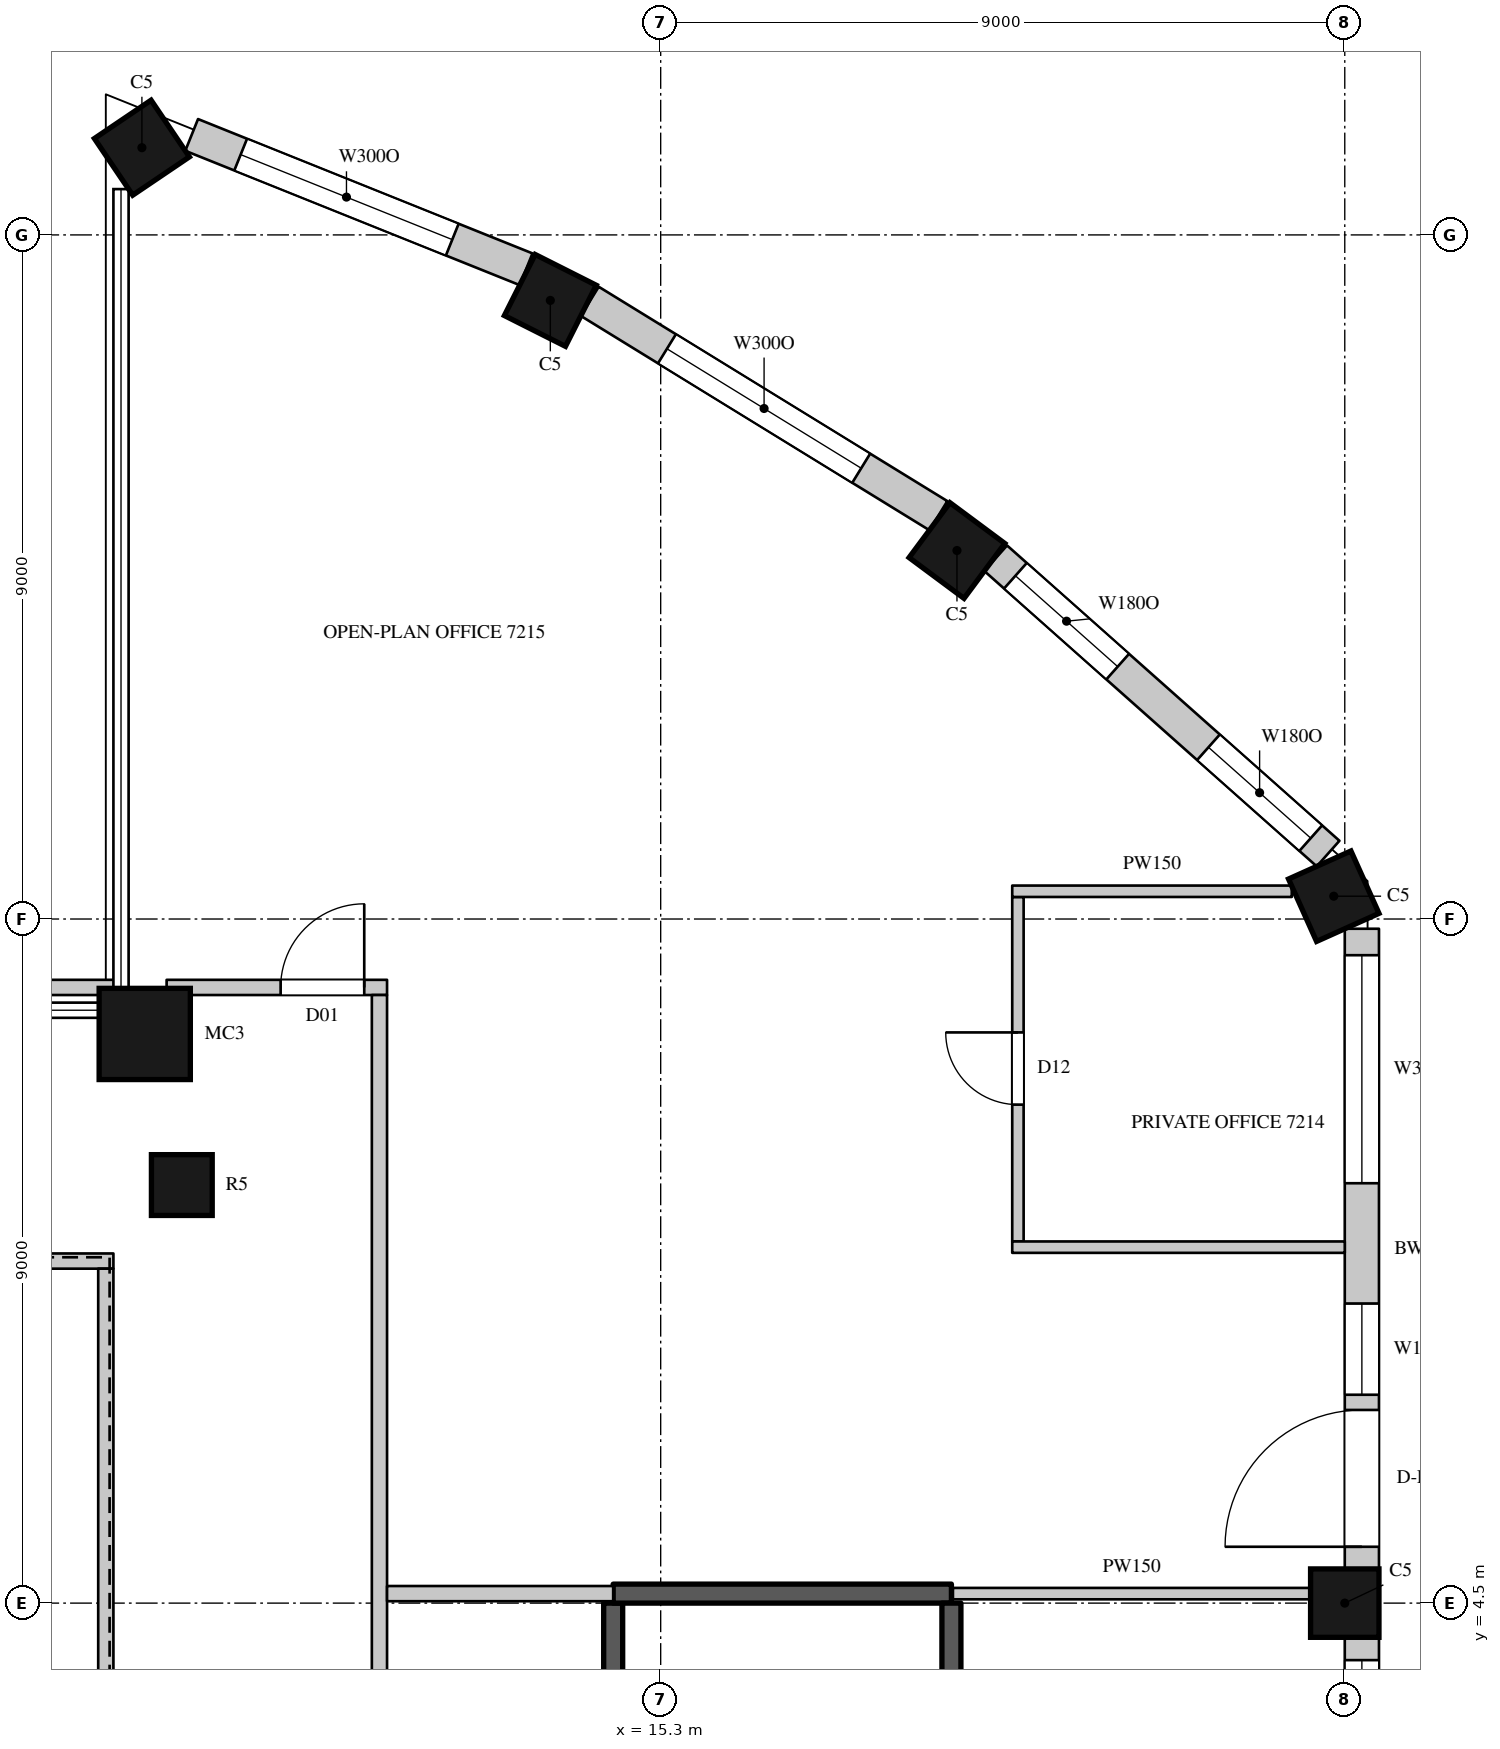
"""IFC4 building model, lengths in metres.
Left out: names, types, materials, properties, quantities, classifications, styles, units other than length and angle.
Written with IfcOpenShell. Run it as: python <this file> out.ifc"""

import sys

from ifc_helpers import new_model, si_unit, direction, frame, frame_2d, origin, origin_2d, place, context, subcontext, project, spatial, rectangle, circle, extrude, element, fill, save


model = new_model("IFC4")
c1 = context("Model", 3, precision=1e-05, world=origin(), true_north=direction((0.0, 1.0)))
c2 = subcontext(c1, "Body", "Model", "MODEL_VIEW")
j1 = project(units=[si_unit("LENGTHUNIT", "METRE"), si_unit("PLANEANGLEUNIT", "RADIAN")], contexts=[c1])
p1 = place(None, origin())
s1 = spatial("IfcSite", under=j1, at=p1, CompositionType="ELEMENT")
p2 = place(p1, origin())
s2 = spatial("IfcBuilding", under=s1, at=p2, CompositionType="ELEMENT")
p3 = place(p2, frame((0.0, 0.0, 317.2)))
s3 = spatial("IfcBuildingStorey", under=s2, at=p3, CompositionType="ELEMENT", Elevation=317.2)
p4 = place(p3, frame((8.475, 23.647, 0.0), z_axis=(0.0, 0.0, 1.0), x_axis=(-0.828469606019, -0.560034027451, 0.0)))
e1 = element("IfcColumn", 1, at=p4, inside=s3, PredefinedType="COLUMN", context=c2, shape_type="SweptSolid", body=[
    extrude(rectangle(XDim=0.9, YDim=0.9, at=origin_2d()), origin(), (0.0, 0.0, 1.0), 4.1),
])
p5 = place(p3, frame((8.512, 11.988, 0.0), z_axis=(0.0, 0.0, 1.0), x_axis=(1.0, 0.0, 0.0)))
e2 = element("IfcColumn", 2, at=p5, inside=s3, PredefinedType="COLUMN", context=c2, shape_type="SweptSolid", body=[
    extrude(circle(Radius=0.6, at=origin_2d()), origin(), (0.0, 0.0, 1.0), 4.1),
])
for number, where, z_axis, x_axis in (
    (3, (24.3, 4.5, 0.0), (0.0, 0.0, 1.0), (0.0, 1.0, 0.0)),
    (4, (24.155, 13.8, 0.0), (0.0, 0.0, 1.0), (-0.41, 0.912, 0.0)),
    (5, (19.198, 18.348, 0.0), (0.0, 0.0, 1.0), (-0.803, 0.596, 0.0)),
    (6, (13.848, 21.638, 0.0), (0.0, 0.0, 1.0), (-0.893, 0.45, 0.0)),
):
    element("IfcColumn", number, at=place(p3, frame(where, z_axis=z_axis, x_axis=x_axis)), inside=s3, PredefinedType="COLUMN", context=c2, shape_type="SweptSolid", body=[
        extrude(rectangle(XDim=0.9, YDim=0.9, at=origin_2d()), origin(), (0.0, 0.0, 1.0), 4.1),
    ])
p6 = place(p3, frame((9.0, 10.0, 0.0), z_axis=(0.0, 0.0, 1.0), x_axis=(1.0, 0.0, 0.0)))
e7 = element("IfcColumn", 7, at=p6, inside=s3, PredefinedType="COLUMN", context=c2, shape_type="SweptSolid", body=[
    extrude(circle(Radius=0.4, at=origin_2d()), origin(), (0.0, 0.0, 1.0), 4.1),
])
p7 = place(p3, frame((24.525, -4.05, 0.0), z_axis=(0.0, 0.0, 1.0), x_axis=(0.0, 1.0, 0.0)))
e8 = element("IfcWall", 8, at=p7, inside=s3, PredefinedType="SOLIDWALL", context=c2, shape_type="SweptSolid", body=[
    extrude(rectangle(XDim=8.1, YDim=0.45, at=frame_2d((4.05, 0.0))), origin(), (0.0, 0.0, 1.0), 3.8),
])
p8 = place(p7, frame((0.3, 0.0, 1.05)))
e9 = element("IfcOpeningElement", 9, at=p8, cuts=e8, PredefinedType="OPENING", context=c2, shape_type="SweptSolid", body=[
    extrude(rectangle(XDim=3.0, YDim=2.4, at=frame_2d((1.5, 1.2))), frame((0.0, 0.235, 0.0), z_axis=(0.0, -1.0, 0.0), x_axis=(1.0, 0.0, 0.0)), (0.0, 0.0, 1.0), 0.47),
])
p9 = place(p7, frame((4.8, 0.0, 1.05)))
e10 = element("IfcOpeningElement", 10, at=p9, cuts=e8, PredefinedType="OPENING", context=c2, shape_type="SweptSolid", body=[
    extrude(rectangle(XDim=3.0, YDim=2.4, at=frame_2d((1.5, 1.2))), frame((0.0, 0.235, 0.0), z_axis=(0.0, -1.0, 0.0), x_axis=(1.0, 0.0, 0.0)), (0.0, 0.0, 1.0), 0.47),
])
p10 = place(p3, frame((24.525, 4.95, 0.0), z_axis=(0.0, 0.0, 1.0), x_axis=(0.0, 1.0, 0.0)))
e11 = element("IfcWall", 11, at=p10, inside=s3, PredefinedType="SOLIDWALL", context=c2, shape_type="SweptSolid", body=[
    extrude(rectangle(XDim=8.422, YDim=0.45, at=frame_2d((4.211, 0.0))), origin(), (0.0, 0.0, 1.0), 3.8),
])
p11 = place(p10, frame((0.291, 0.0, 0.0)))
e12 = element("IfcOpeningElement", 12, at=p11, cuts=e11, PredefinedType="OPENING", context=c2, shape_type="SweptSolid", body=[
    extrude(rectangle(XDim=1.8, YDim=2.4, at=frame_2d((0.9, 1.2))), frame((0.0, 0.235, 0.0), z_axis=(0.0, -1.0, 0.0), x_axis=(1.0, 0.0, 0.0)), (0.0, 0.0, 1.0), 0.47),
])
p12 = place(p10, frame((2.291, 0.0, 1.05)))
e13 = element("IfcOpeningElement", 13, at=p12, cuts=e11, PredefinedType="OPENING", context=c2, shape_type="SweptSolid", body=[
    extrude(rectangle(XDim=1.2, YDim=2.4, at=frame_2d((0.6, 1.2))), frame((0.0, 0.235, 0.0), z_axis=(0.0, -1.0, 0.0), x_axis=(1.0, 0.0, 0.0)), (0.0, 0.0, 1.0), 0.47),
])
p13 = place(p10, frame((5.074, 0.0, 1.05)))
e14 = element("IfcOpeningElement", 14, at=p13, cuts=e11, PredefinedType="OPENING", context=c2, shape_type="SweptSolid", body=[
    extrude(rectangle(XDim=3.0, YDim=2.4, at=frame_2d((1.5, 1.2))), frame((0.0, 0.235, 0.0), z_axis=(0.0, -1.0, 0.0), x_axis=(1.0, 0.0, 0.0)), (0.0, 0.0, 1.0), 0.47),
])
p14 = place(p3, frame((24.081, 14.361, 0.0), z_axis=(0.0, 0.0, 1.0), x_axis=(-0.747570482973, 0.664182484704, 0.0)))
e15 = element("IfcWall", 15, at=p14, inside=s3, PredefinedType="SOLIDWALL", context=c2, shape_type="SweptSolid", body=[
    extrude(rectangle(XDim=5.85, YDim=0.45, at=frame_2d((2.925, 0.0))), origin(), (0.0, 0.0, 1.0), 3.8),
])
p15 = place(p14, frame((0.305, 0.0, 1.05)))
e16 = element("IfcOpeningElement", 16, at=p15, cuts=e15, PredefinedType="OPENING", context=c2, shape_type="SweptSolid", body=[
    extrude(rectangle(XDim=1.8, YDim=2.4, at=frame_2d((0.9, 1.2))), frame((0.0, 0.235, 0.0), z_axis=(0.0, -1.0, 0.0), x_axis=(1.0, 0.0, 0.0)), (0.0, 0.0, 1.0), 0.47),
])
p16 = place(p14, frame((3.703, 0.0, 1.05)))
e17 = element("IfcOpeningElement", 17, at=p16, cuts=e15, PredefinedType="OPENING", context=c2, shape_type="SweptSolid", body=[
    extrude(rectangle(XDim=1.8, YDim=2.4, at=frame_2d((0.9, 1.2))), frame((0.0, 0.235, 0.0), z_axis=(0.0, -1.0, 0.0), x_axis=(1.0, 0.0, 0.0)), (0.0, 0.0, 1.0), 0.47),
])
p17 = place(p3, frame((18.953, 18.806, 0.0), z_axis=(0.0, 0.0, 1.0), x_axis=(-0.851860664503, 0.523768468193, 0.0)))
e18 = element("IfcWall", 18, at=p17, inside=s3, PredefinedType="SOLIDWALL", context=c2, shape_type="SweptSolid", body=[
    extrude(rectangle(XDim=5.384, YDim=0.45, at=frame_2d((2.692, 0.0))), origin(), (0.0, 0.0, 1.0), 3.8),
])
p18 = place(p17, frame((1.192, 0.0, 1.05)))
e19 = element("IfcOpeningElement", 19, at=p18, cuts=e18, PredefinedType="OPENING", context=c2, shape_type="SweptSolid", body=[
    extrude(rectangle(XDim=3.0, YDim=2.4, at=frame_2d((1.5, 1.2))), frame((0.0, 0.235, 0.0), z_axis=(0.0, -1.0, 0.0), x_axis=(1.0, 0.0, 0.0)), (0.0, 0.0, 1.0), 0.47),
])
p19 = place(p3, frame((13.529, 22.048, 0.0), z_axis=(0.0, 0.0, 1.0), x_axis=(-0.927957332619, 0.372686448424, 0.0)))
e20 = element("IfcWall", 20, at=p19, inside=s3, PredefinedType="SOLIDWALL", context=c2, shape_type="SweptSolid", body=[
    extrude(rectangle(XDim=4.741, YDim=0.45, at=frame_2d((2.371, 0.0))), origin(), (0.0, 0.0, 1.0), 3.8),
])
p20 = place(p19, frame((1.047, 0.0, 1.05)))
e21 = element("IfcOpeningElement", 21, at=p20, cuts=e20, PredefinedType="OPENING", context=c2, shape_type="SweptSolid", body=[
    extrude(rectangle(XDim=3.0, YDim=2.4, at=frame_2d((1.5, 1.2))), frame((0.0, 0.235, 0.0), z_axis=(0.0, -1.0, 0.0), x_axis=(1.0, 0.0, 0.0)), (0.0, 0.0, 1.0), 0.47),
])
p21 = place(p3, frame((6.75, 12.6, 0.0), z_axis=(0.0, 0.0, 1.0), x_axis=(1.0, 0.0, 0.0)))
e22 = element("IfcWall", 22, at=p21, inside=s3, PredefinedType="PARTITIONING", context=c2, shape_type="SweptSolid", body=[
    extrude(rectangle(XDim=1.48, YDim=0.2, at=frame_2d((0.74, 0.0))), origin(), (0.0, 0.0, 1.0), 3.8),
])
p22 = place(p3, frame((-6.1, 9.0, 0.0), z_axis=(0.0, 0.0, 1.0), x_axis=(1.0, 0.0, 0.0)))
e23 = element("IfcWall", 23, at=p22, inside=s3, PredefinedType="PARTITIONING", context=c2, shape_type="SweptSolid", body=[
    extrude(rectangle(XDim=14.2, YDim=0.2, at=frame_2d((7.1, 0.0))), origin(), (0.0, 0.0, 1.0), 3.8),
])
p23 = place(p3, frame((8.0, 0.02, 0.0), z_axis=(0.0, 0.0, 1.0), x_axis=(0.0, 1.0, 0.0)))
e24 = element("IfcWall", 24, at=p23, inside=s3, PredefinedType="PARTITIONING", context=c2, shape_type="SweptSolid", body=[
    extrude(rectangle(XDim=8.88, YDim=0.2, at=frame_2d((4.44, 0.0))), origin(), (0.0, 0.0, 1.0), 3.8),
])
p24 = place(p3, frame((8.8, 12.6, 0.0), z_axis=(0.0, 0.0, 1.0), x_axis=(1.0, 0.0, 0.0)))
e25 = element("IfcWall", 25, at=p24, inside=s3, PredefinedType="PARTITIONING", context=c2, shape_type="SweptSolid", body=[
    extrude(rectangle(XDim=2.9, YDim=0.2, at=frame_2d((1.45, 0.0))), origin(), (0.0, 0.0, 1.0), 3.8),
])
p25 = place(p24, frame((1.5, 0.0, 0.0)))
e26 = element("IfcOpeningElement", 26, at=p25, cuts=e25, PredefinedType="OPENING", context=c2, shape_type="SweptSolid", body=[
    extrude(rectangle(XDim=1.1, YDim=2.4, at=frame_2d((0.55, 1.2))), frame((0.0, 0.11, 0.0), z_axis=(0.0, -1.0, 0.0), x_axis=(1.0, 0.0, 0.0)), (0.0, 0.0, 1.0), 0.22),
])
p26 = place(p3, frame((11.6, -12.5, 0.0), z_axis=(0.0, 0.0, 1.0), x_axis=(0.0, 1.0, 0.0)))
e27 = element("IfcWall", 27, at=p26, inside=s3, PredefinedType="PARTITIONING", context=c2, shape_type="SweptSolid", body=[
    extrude(rectangle(XDim=25.0, YDim=0.2, at=frame_2d((12.5, 0.0))), origin(), (0.0, 0.0, 1.0), 3.8),
])
p27 = place(p26, frame((9.4, 0.0, 0.0)))
e28 = element("IfcOpeningElement", 28, at=p27, cuts=e27, PredefinedType="OPENING", context=c2, shape_type="SweptSolid", body=[
    extrude(rectangle(XDim=1.5, YDim=2.4, at=frame_2d((0.75, 1.2))), frame((0.0, 0.11, 0.0), z_axis=(0.0, -1.0, 0.0), x_axis=(1.0, 0.0, 0.0)), (0.0, 0.0, 1.0), 0.22),
])
p28 = place(p26, frame((5.5, 0.0, 0.0)))
e29 = element("IfcOpeningElement", 29, at=p28, cuts=e27, PredefinedType="OPENING", context=c2, shape_type="SweptSolid", body=[
    extrude(rectangle(XDim=1.1, YDim=2.4, at=frame_2d((0.55, 1.2))), frame((0.0, 0.11, 0.0), z_axis=(0.0, -1.0, 0.0), x_axis=(1.0, 0.0, 0.0)), (0.0, 0.0, 1.0), 0.22),
])
p29 = place(p3, frame((11.7, 4.625, 0.0), z_axis=(0.0, 0.0, 1.0), x_axis=(1.0, 0.0, 0.0)))
e30 = element("IfcWall", 30, at=p29, inside=s3, PredefinedType="PARTITIONING", context=c2, shape_type="SweptSolid", body=[
    extrude(rectangle(XDim=2.975, YDim=0.2, at=frame_2d((1.488, 0.0))), origin(), (0.0, 0.0, 1.0), 3.8),
])
p30 = place(p3, frame((19.145, 4.625, 0.0), z_axis=(0.0, 0.0, 1.0), x_axis=(1.0, 0.0, 0.0)))
e31 = element("IfcWall", 31, at=p30, inside=s3, PredefinedType="PARTITIONING", context=c2, shape_type="SweptSolid", body=[
    extrude(rectangle(XDim=4.705, YDim=0.15, at=frame_2d((2.353, 0.0))), origin(), (0.0, 0.0, 1.0), 3.8),
])
p31 = place(p3, frame((20.0, 9.258, 0.0), z_axis=(0.0, 0.0, 1.0), x_axis=(0.0, 1.0, 0.0)))
e32 = element("IfcWall", 32, at=p31, inside=s3, PredefinedType="PARTITIONING", context=c2, shape_type="SweptSolid", body=[
    extrude(rectangle(XDim=4.532, YDim=0.15, at=frame_2d((2.266, 0.0))), origin(), (0.0, 0.0, 1.0), 3.8),
])
p32 = place(p31, frame((1.8, 0.0, 0.0)))
e33 = element("IfcOpeningElement", 33, at=p32, cuts=e32, PredefinedType="OPENING", context=c2, shape_type="SweptSolid", body=[
    extrude(rectangle(XDim=0.95, YDim=2.2, at=frame_2d((0.475, 1.1))), frame((0.0, 0.085, 0.0), z_axis=(0.0, -1.0, 0.0), x_axis=(1.0, 0.0, 0.0)), (0.0, 0.0, 1.0), 0.17),
])
p33 = place(p3, frame((19.925, 9.183, 0.0), z_axis=(0.0, 0.0, 1.0), x_axis=(1.0, 0.0, 0.0)))
e34 = element("IfcWall", 34, at=p33, inside=s3, PredefinedType="PARTITIONING", context=c2, shape_type="SweptSolid", body=[
    extrude(rectangle(XDim=4.375, YDim=0.15, at=frame_2d((2.188, 0.0))), origin(), (0.0, 0.0, 1.0), 3.15),
])
p34 = place(p3, frame((19.925, 13.865, 0.0), z_axis=(0.0, 0.0, 1.0), x_axis=(1.0, 0.0, 0.0)))
e35 = element("IfcWall", 35, at=p34, inside=s3, PredefinedType="PARTITIONING", context=c2, shape_type="SweptSolid", body=[
    extrude(rectangle(XDim=3.678, YDim=0.15, at=frame_2d((1.839, 0.0))), origin(), (0.0, 0.0, 1.0), 3.8),
])
p35 = place(p3, frame((14.675, -4.5, 0.0), z_axis=(0.0, 0.0, 1.0), x_axis=(0.0, 1.0, 0.0)))
e36 = element("IfcWall", 36, at=p35, inside=s3, PredefinedType="SHEAR", context=c2, shape_type="SweptSolid", body=[
    extrude(rectangle(XDim=9.0, YDim=0.25, at=frame_2d((4.5, 0.0))), origin(), (0.0, 0.0, 1.0), 3.8),
])
p36 = place(p35, frame((0.45, 0.0, 0.0)))
e37 = element("IfcOpeningElement", 37, at=p36, cuts=e36, PredefinedType="OPENING", context=c2, shape_type="SweptSolid", body=[
    extrude(rectangle(XDim=1.1, YDim=2.2, at=frame_2d((0.55, 1.1))), frame((0.0, 0.135, 0.0), z_axis=(0.0, -1.0, 0.0), x_axis=(1.0, 0.0, 0.0)), (0.0, 0.0, 1.0), 0.27),
])
p37 = place(p3, frame((14.675, 4.625, 0.0), z_axis=(0.0, 0.0, 1.0), x_axis=(1.0, 0.0, 0.0)))
e38 = element("IfcWall", 38, at=p37, inside=s3, PredefinedType="SHEAR", context=c2, shape_type="SweptSolid", body=[
    extrude(rectangle(XDim=4.45, YDim=0.25, at=frame_2d((2.225, 0.0))), origin(), (0.0, 0.0, 1.0), 3.8),
])
p38 = place(p3, frame((19.125, -4.5, 0.0), z_axis=(0.0, 0.0, 1.0), x_axis=(0.0, 1.0, 0.0)))
e39 = element("IfcWall", 39, at=p38, inside=s3, PredefinedType="SHEAR", context=c2, shape_type="SweptSolid", body=[
    extrude(rectangle(XDim=9.0, YDim=0.25, at=frame_2d((4.5, 0.0))), origin(), (0.0, 0.0, 1.0), 3.8),
])
p39 = place(p9, origin())
e40 = element("IfcWindow", 40, at=p39, inside=s3, PartitioningType="SINGLE_PANEL", PredefinedType="WINDOW", context=c2, shape_type="SweptSolid", body=[
    extrude(rectangle(XDim=3.0, YDim=2.4, at=frame_2d((1.5, 1.2))), frame((0.0, 0.135, 0.0), z_axis=(0.0, -1.0, 0.0), x_axis=(1.0, 0.0, 0.0)), (0.0, 0.0, 1.0), 0.06),
])
fill(e10, e40)
p40 = place(p11, origin())
e41 = element("IfcDoor", 41, at=p40, inside=s3, OperationType="SLIDING_TO_LEFT", PredefinedType="DOOR", context=c2, shape_type="SweptSolid", body=[
    extrude(rectangle(XDim=1.8, YDim=2.4, at=frame_2d((0.9, 1.2))), frame((0.0, 0.13, 0.0), z_axis=(0.0, -1.0, 0.0), x_axis=(1.0, 0.0, 0.0)), (0.0, 0.0, 1.0), 0.05),
])
fill(e12, e41)
p41 = place(p12, origin())
e42 = element("IfcWindow", 42, at=p41, inside=s3, PartitioningType="SINGLE_PANEL", PredefinedType="WINDOW", context=c2, shape_type="SweptSolid", body=[
    extrude(rectangle(XDim=1.2, YDim=2.4, at=frame_2d((0.6, 1.2))), frame((0.0, 0.135, 0.0), z_axis=(0.0, -1.0, 0.0), x_axis=(1.0, 0.0, 0.0)), (0.0, 0.0, 1.0), 0.06),
])
fill(e13, e42)
p42 = place(p13, origin())
e43 = element("IfcWindow", 43, at=p42, inside=s3, PartitioningType="SINGLE_PANEL", PredefinedType="WINDOW", context=c2, shape_type="SweptSolid", body=[
    extrude(rectangle(XDim=3.0, YDim=2.4, at=frame_2d((1.5, 1.2))), frame((0.0, 0.135, 0.0), z_axis=(0.0, -1.0, 0.0), x_axis=(1.0, 0.0, 0.0)), (0.0, 0.0, 1.0), 0.06),
])
fill(e14, e43)
p43 = place(p15, origin())
e44 = element("IfcWindow", 44, at=p43, inside=s3, PartitioningType="SINGLE_PANEL", PredefinedType="WINDOW", context=c2, shape_type="SweptSolid", body=[
    extrude(rectangle(XDim=1.8, YDim=2.4, at=frame_2d((0.9, 1.2))), frame((0.0, 0.135, 0.0), z_axis=(0.0, -1.0, 0.0), x_axis=(1.0, 0.0, 0.0)), (0.0, 0.0, 1.0), 0.06),
])
fill(e16, e44)
p44 = place(p16, origin())
e45 = element("IfcWindow", 45, at=p44, inside=s3, PartitioningType="SINGLE_PANEL", PredefinedType="WINDOW", context=c2, shape_type="SweptSolid", body=[
    extrude(rectangle(XDim=1.8, YDim=2.4, at=frame_2d((0.9, 1.2))), frame((0.0, 0.135, 0.0), z_axis=(0.0, -1.0, 0.0), x_axis=(1.0, 0.0, 0.0)), (0.0, 0.0, 1.0), 0.06),
])
fill(e17, e45)
p45 = place(p18, origin())
e46 = element("IfcWindow", 46, at=p45, inside=s3, PartitioningType="SINGLE_PANEL", PredefinedType="WINDOW", context=c2, shape_type="SweptSolid", body=[
    extrude(rectangle(XDim=3.0, YDim=2.4, at=frame_2d((1.5, 1.2))), frame((0.0, 0.135, 0.0), z_axis=(0.0, -1.0, 0.0), x_axis=(1.0, 0.0, 0.0)), (0.0, 0.0, 1.0), 0.06),
])
fill(e19, e46)
p46 = place(p20, origin())
e47 = element("IfcWindow", 47, at=p46, inside=s3, PartitioningType="SINGLE_PANEL", PredefinedType="WINDOW", context=c2, shape_type="SweptSolid", body=[
    extrude(rectangle(XDim=3.0, YDim=2.4, at=frame_2d((1.5, 1.2))), frame((0.0, 0.135, 0.0), z_axis=(0.0, -1.0, 0.0), x_axis=(1.0, 0.0, 0.0)), (0.0, 0.0, 1.0), 0.06),
])
fill(e21, e47)
p47 = place(p25, origin())
e48 = element("IfcDoor", 48, at=p47, inside=s3, OperationType="SINGLE_SWING_RIGHT", PredefinedType="DOOR", context=c2, shape_type="SweptSolid", body=[
    extrude(rectangle(XDim=1.1, YDim=2.4, at=frame_2d((0.55, 1.2))), frame((0.0, 0.025, 0.0), z_axis=(0.0, -1.0, 0.0), x_axis=(1.0, 0.0, 0.0)), (0.0, 0.0, 1.0), 0.05),
])
fill(e26, e48)
p48 = place(p32, origin())
e49 = element("IfcDoor", 49, at=p48, inside=s3, OperationType="SINGLE_SWING_RIGHT", PredefinedType="DOOR", context=c2, shape_type="SweptSolid", body=[
    extrude(rectangle(XDim=0.95, YDim=2.2, at=frame_2d((0.475, 1.1))), frame((0.0, 0.025, 0.0), z_axis=(0.0, -1.0, 0.0), x_axis=(1.0, 0.0, 0.0)), (0.0, 0.0, 1.0), 0.05),
])
fill(e33, e49)
save(model, sys.argv[1])
